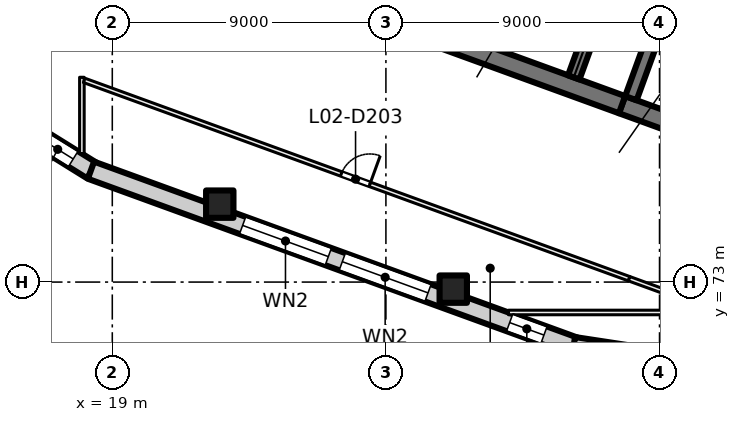
"""IFC4 building model, lengths in metres.
Left out: names, types, materials, properties, quantities, classifications, styles, units other than length and angle.
Written with IfcOpenShell. Run it as: python <this file> out.ifc"""

import sys

from ifc_helpers import new_model, si_unit, direction, frame, frame_2d, origin, origin_2d, place, context, subcontext, project, spatial, rectangle, extrude, element, fill, save


model = new_model("IFC4")
c1 = context("Model", 3, precision=1e-05, world=origin(), true_north=direction((0.0, 1.0)))
c2 = subcontext(c1, "Body", "Model", "MODEL_VIEW")
j1 = project(units=[si_unit("LENGTHUNIT", "METRE"), si_unit("PLANEANGLEUNIT", "RADIAN")], contexts=[c1])
p1 = place(None, origin())
s1 = spatial("IfcSite", under=j1, at=p1, CompositionType="ELEMENT")
p2 = place(p1, origin())
s2 = spatial("IfcBuilding", under=s1, at=p2, CompositionType="ELEMENT")
p3 = place(p2, frame((0.0, 0.0, 12.5)))
s3 = spatial("IfcBuildingStorey", under=s2, at=p3, CompositionType="ELEMENT", Elevation=12.5)
for number, where, z_axis, x_axis in (
    (1, (30.215, 72.768, 0.0), (0.0, 0.0, 1.0), (1.0, 0.0, 0.0)),
    (2, (22.535, 75.563, 0.0), (0.0, 0.0, 1.0), (1.0, 0.0, 0.0)),
):
    element("IfcColumn", number, at=place(p3, frame(where, z_axis=z_axis, x_axis=x_axis)), inside=s3, PredefinedType="COLUMN", context=c2, shape_type="SweptSolid", body=[
        extrude(rectangle(XDim=0.9, YDim=0.9, at=origin_2d()), origin(), (0.0, 0.0, 1.0), 5.0),
    ])
p4 = place(p3, frame((39.338, 77.535, 0.0), z_axis=(0.0, 0.0, 1.0), x_axis=(-0.939701471648, 0.341995824804, 0.0)))
e3 = element("IfcWall", 3, at=p4, inside=s3, PredefinedType="SHEAR", context=c2, shape_type="SweptSolid", body=[
    extrude(rectangle(XDim=3.8, YDim=0.6, at=frame_2d((1.9, 0.0))), origin(), (0.0, 0.0, 1.0), 5.0),
])
p5 = place(p3, frame((35.767, 78.835, 0.0), z_axis=(0.0, 0.0, 1.0), x_axis=(-0.939692894512, 0.342019391267, 0.0)))
e4 = element("IfcWall", 4, at=p5, inside=s3, PredefinedType="SHEAR", context=c2, shape_type="SweptSolid", body=[
    extrude(rectangle(XDim=14.4, YDim=0.6, at=frame_2d((7.2, 0.0))), origin(), (0.0, 0.0, 1.0), 5.0),
])
p6 = place(p3, frame((36.058, 79.048, 0.0), z_axis=(0.0, 0.0, 1.0), x_axis=(0.342016982193, 0.939693771338, 0.0)))
e5 = element("IfcWall", 5, at=p6, inside=s3, PredefinedType="SHEAR", context=c2, shape_type="SweptSolid", body=[
    extrude(rectangle(XDim=7.8, YDim=0.4, at=frame_2d((3.9, 0.0))), origin(), (0.0, 0.0, 1.0), 5.0),
])
p7 = place(p3, frame((34.178, 79.732, 0.0), z_axis=(0.0, 0.0, 1.0), x_axis=(0.342014590177, 0.939694641948, 0.0)))
e6 = element("IfcWall", 6, at=p7, inside=s3, PredefinedType="SHEAR", context=c2, shape_type="SweptSolid", body=[
    extrude(rectangle(XDim=12.2, YDim=0.4, at=frame_2d((6.1, 0.0))), origin(), (0.0, 0.0, 1.0), 5.0),
])
p8 = place(p3, frame((18.329, 76.668, 0.0), z_axis=(0.0, 0.0, 1.0), x_axis=(-0.849679171995, 0.527300013918, 0.0)))
e7 = element("IfcWall", 7, at=p8, inside=s3, PredefinedType="SOLIDWALL", context=c2, shape_type="SweptSolid", body=[
    extrude(rectangle(XDim=4.062, YDim=0.6, at=frame_2d((2.031, 0.0))), origin(), (0.0, 0.0, 1.0), 4.6),
])
p9 = place(p8, frame((0.723, 0.0, 0.9)))
e8 = element("IfcOpeningElement", 8, at=p9, cuts=e7, PredefinedType="OPENING", context=c2, shape_type="SweptSolid", body=[
    extrude(rectangle(XDim=1.2, YDim=3.0, at=frame_2d((0.6, 1.5))), frame((0.0, 0.31, 0.0), z_axis=(0.0, -1.0, 0.0), x_axis=(1.0, 0.0, 0.0)), (0.0, 0.0, 1.0), 0.62),
])
p10 = place(p3, frame((34.204, 70.89, 0.0), z_axis=(0.0, 0.0, 1.0), x_axis=(-0.939693996621, 0.342016363227, 0.0)))
e9 = element("IfcWall", 9, at=p10, inside=s3, PredefinedType="SOLIDWALL", context=c2, shape_type="SweptSolid", body=[
    extrude(rectangle(XDim=16.926, YDim=0.6, at=frame_2d((8.463, 0.0))), origin(), (0.0, 0.0, 1.0), 4.6),
])
p11 = place(p10, frame((1.071, 0.0, 0.9)))
e10 = element("IfcOpeningElement", 10, at=p11, cuts=e9, PredefinedType="OPENING", context=c2, shape_type="SweptSolid", body=[
    extrude(rectangle(XDim=1.2, YDim=3.0, at=frame_2d((0.6, 1.5))), frame((0.0, 0.31, 0.0), z_axis=(0.0, -1.0, 0.0), x_axis=(1.0, 0.0, 0.0)), (0.0, 0.0, 1.0), 0.62),
])
p12 = place(p10, frame((5.129, 0.0, 0.9)))
e11 = element("IfcOpeningElement", 11, at=p12, cuts=e9, PredefinedType="OPENING", context=c2, shape_type="SweptSolid", body=[
    extrude(rectangle(XDim=3.0, YDim=3.0, at=frame_2d((1.5, 1.5))), frame((0.0, 0.31, 0.0), z_axis=(0.0, -1.0, 0.0), x_axis=(1.0, 0.0, 0.0)), (0.0, 0.0, 1.0), 0.62),
])
p13 = place(p10, frame((8.618, 0.0, 0.9)))
e12 = element("IfcOpeningElement", 12, at=p13, cuts=e9, PredefinedType="OPENING", context=c2, shape_type="SweptSolid", body=[
    extrude(rectangle(XDim=3.0, YDim=3.0, at=frame_2d((1.5, 1.5))), frame((0.0, 0.31, 0.0), z_axis=(0.0, -1.0, 0.0), x_axis=(1.0, 0.0, 0.0)), (0.0, 0.0, 1.0), 0.62),
])
p14 = place(p3, frame((38.022, 70.308, 0.0), z_axis=(0.0, 0.0, 1.0), x_axis=(-0.98857030495, 0.150760578968, 0.0)))
e13 = element("IfcWall", 13, at=p14, inside=s3, PredefinedType="SOLIDWALL", context=c2, shape_type="SweptSolid", body=[
    extrude(rectangle(XDim=3.891, YDim=0.6, at=frame_2d((1.946, 0.0))), origin(), (0.0, 0.0, 1.0), 4.6),
])
p15 = place(p3, frame((18.0, 77.225, 0.0), z_axis=(0.0, 0.0, 1.0), x_axis=(0.0, 1.0, 0.0)))
e14 = element("IfcWall", 14, at=p15, inside=s3, PredefinedType="PARTITIONING", context=c2, shape_type="SweptSolid", body=[
    extrude(rectangle(XDim=2.511, YDim=0.15, at=frame_2d((1.255, 0.0))), origin(), (0.0, 0.0, 1.0), 4.6),
])
p16 = place(p3, frame((36.0, 73.11, 0.0), z_axis=(0.0, 0.0, 1.0), x_axis=(-0.939696975073, 0.342008179784, 0.0)))
e15 = element("IfcWall", 15, at=p16, inside=s3, PredefinedType="PARTITIONING", context=c2, shape_type="SweptSolid", body=[
    extrude(rectangle(XDim=19.075, YDim=0.15, at=frame_2d((9.538, 0.0))), origin(), (0.0, 0.0, 1.0), 4.6),
])
p17 = place(p16, frame((9.076, 0.0, 0.0)))
e16 = element("IfcOpeningElement", 16, at=p17, cuts=e15, PredefinedType="OPENING", context=c2, shape_type="SweptSolid", body=[
    extrude(rectangle(XDim=1.0, YDim=2.1, at=frame_2d((0.5, 1.05))), frame((0.0, 0.085, 0.0), z_axis=(0.0, -1.0, 0.0), x_axis=(1.0, 0.0, 0.0)), (0.0, 0.0, 1.0), 0.17),
])
p18 = place(p3, frame((32.032, 72.0, 0.0), z_axis=(0.0, 0.0, 1.0), x_axis=(1.0, 0.0, 0.0)))
e17 = element("IfcWall", 17, at=p18, inside=s3, PredefinedType="PARTITIONING", context=c2, shape_type="SweptSolid", body=[
    extrude(rectangle(XDim=11.926, YDim=0.15, at=frame_2d((5.963, 0.0))), origin(), (0.0, 0.0, 1.0), 4.6),
])
p19 = place(p3, frame((36.0, 73.11, 0.0), z_axis=(0.0, 0.0, 1.0), x_axis=(0.939696948785, -0.34200825201, 0.0)))
e18 = element("IfcWall", 18, at=p19, inside=s3, PredefinedType="PARTITIONING", context=c2, shape_type="SweptSolid", body=[
    extrude(rectangle(XDim=1.626, YDim=0.15, at=frame_2d((0.813, 0.0))), origin(), (0.0, 0.0, 1.0), 4.6),
])
p20 = place(p9, origin())
e19 = element("IfcWindow", 19, at=p20, inside=s3, PartitioningType="SINGLE_PANEL", PredefinedType="WINDOW", context=c2, shape_type="SweptSolid", body=[
    extrude(rectangle(XDim=1.2, YDim=3.0, at=frame_2d((0.6, 1.5))), frame((0.0, 0.03, 0.0), z_axis=(0.0, -1.0, 0.0), x_axis=(1.0, 0.0, 0.0)), (0.0, 0.0, 1.0), 0.06),
])
fill(e8, e19)
p21 = place(p11, origin())
e20 = element("IfcWindow", 20, at=p21, inside=s3, PartitioningType="SINGLE_PANEL", PredefinedType="WINDOW", context=c2, shape_type="SweptSolid", body=[
    extrude(rectangle(XDim=1.2, YDim=3.0, at=frame_2d((0.6, 1.5))), frame((0.0, 0.03, 0.0), z_axis=(0.0, -1.0, 0.0), x_axis=(1.0, 0.0, 0.0)), (0.0, 0.0, 1.0), 0.06),
])
fill(e10, e20)
p22 = place(p12, origin())
e21 = element("IfcWindow", 21, at=p22, inside=s3, PartitioningType="SINGLE_PANEL", PredefinedType="WINDOW", context=c2, shape_type="SweptSolid", body=[
    extrude(rectangle(XDim=3.0, YDim=3.0, at=frame_2d((1.5, 1.5))), frame((0.0, 0.03, 0.0), z_axis=(0.0, -1.0, 0.0), x_axis=(1.0, 0.0, 0.0)), (0.0, 0.0, 1.0), 0.06),
])
fill(e11, e21)
p23 = place(p13, origin())
e22 = element("IfcWindow", 22, at=p23, inside=s3, PartitioningType="SINGLE_PANEL", PredefinedType="WINDOW", context=c2, shape_type="SweptSolid", body=[
    extrude(rectangle(XDim=3.0, YDim=3.0, at=frame_2d((1.5, 1.5))), frame((0.0, 0.03, 0.0), z_axis=(0.0, -1.0, 0.0), x_axis=(1.0, 0.0, 0.0)), (0.0, 0.0, 1.0), 0.06),
])
fill(e12, e22)
p24 = place(p17, origin())
e23 = element("IfcDoor", 23, at=p24, inside=s3, OperationType="SINGLE_SWING_LEFT", PredefinedType="DOOR", context=c2, shape_type="SweptSolid", body=[
    extrude(rectangle(XDim=1.0, YDim=2.1, at=frame_2d((0.5, 1.05))), frame((0.0, 0.025, 0.0), z_axis=(0.0, -1.0, 0.0), x_axis=(1.0, 0.0, 0.0)), (0.0, 0.0, 1.0), 0.05),
])
fill(e16, e23)
save(model, sys.argv[1])
